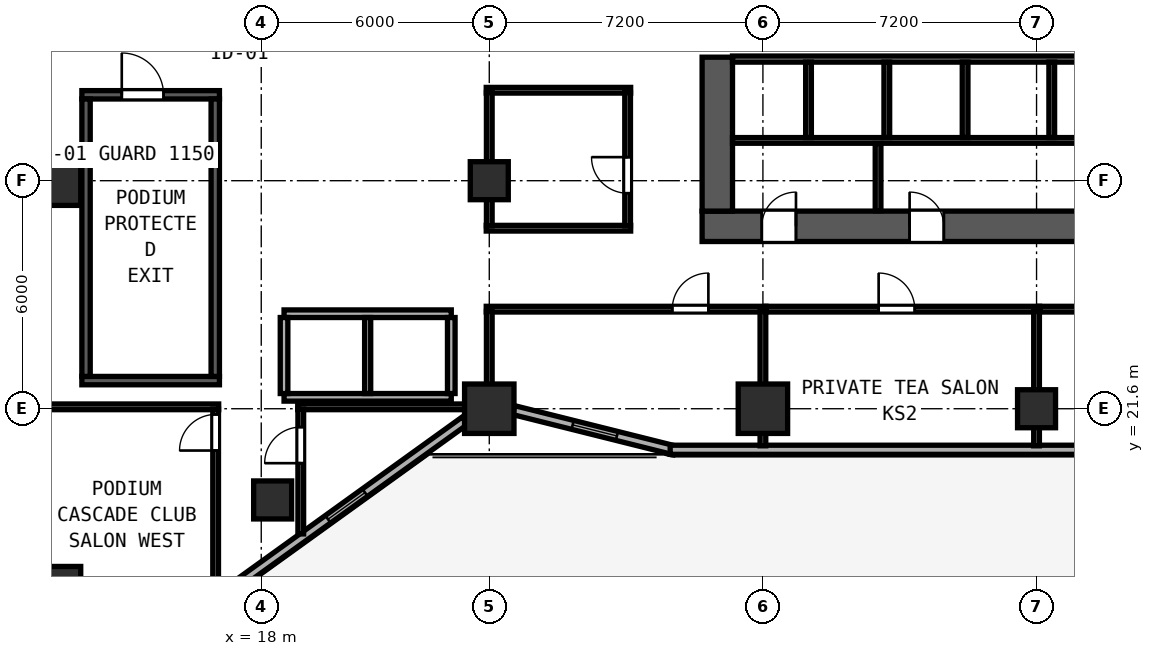
"""IFC4 building model, lengths in metres.
Left out: names, types, materials, properties, quantities, classifications, styles, units other than length and angle.
Written with IfcOpenShell. Run it as: python <this file> out.ifc"""

import sys

from ifc_helpers import new_model, si_unit, direction, frame, frame_2d, origin, origin_2d, place, context, subcontext, project, spatial, rectangle, hollow_rectangle, extrude, element, fill, save


model = new_model("IFC4")
c1 = context("Model", 3, precision=1e-05, world=origin(), true_north=direction((0.0, 1.0)))
c2 = subcontext(c1, "Body", "Model", "MODEL_VIEW")
j1 = project(units=[si_unit("LENGTHUNIT", "METRE"), si_unit("PLANEANGLEUNIT", "RADIAN")], contexts=[c1])
p1 = place(None, origin())
s1 = spatial("IfcSite", under=j1, at=p1, CompositionType="ELEMENT")
p2 = place(p1, origin())
s2 = spatial("IfcBuilding", under=s1, at=p2, CompositionType="ELEMENT")
p3 = place(p2, frame((0.0, 0.0, 24.0)))
s3 = spatial("IfcBuildingStorey", under=s2, at=p3, CompositionType="ELEMENT", Elevation=24.0)
p4 = place(p3, frame((29.6, 26.4, 0.0), z_axis=(0.0, 0.0, 1.0), x_axis=(1.0, 0.0, 0.0)))
e1 = element("IfcWall", 1, at=p4, inside=s3, PredefinedType="SHEAR", context=c2, shape_type="SweptSolid", body=[
    extrude(rectangle(XDim=17.6, YDim=0.8, at=frame_2d((8.8, 0.0))), origin(), (0.0, 0.0, 1.0), 3.6),
])
p5 = place(p4, frame((2.47, 0.0, 0.0), z_axis=(0.0, 0.0, 1.0), x_axis=(-1.0, 0.0, 0.0)))
e2 = element("IfcOpeningElement", 2, at=p5, cuts=e1, PredefinedType="OPENING", context=c2, shape_type="SweptSolid", body=[
    extrude(rectangle(XDim=0.9, YDim=2.1, at=frame_2d((0.45, 1.05))), frame((0.0, 0.41, 0.0), z_axis=(0.0, -1.0, 0.0), x_axis=(1.0, 0.0, 0.0)), (0.0, 0.0, 1.0), 0.82),
])
p6 = place(p4, frame((6.36, 0.0, 0.0), z_axis=(0.0, 0.0, 1.0), x_axis=(-1.0, 0.0, 0.0)))
e3 = element("IfcOpeningElement", 3, at=p6, cuts=e1, PredefinedType="OPENING", context=c2, shape_type="SweptSolid", body=[
    extrude(rectangle(XDim=0.9, YDim=2.1, at=frame_2d((0.45, 1.05))), frame((0.0, 0.41, 0.0), z_axis=(0.0, -1.0, 0.0), x_axis=(1.0, 0.0, 0.0)), (0.0, 0.0, 1.0), 0.82),
])
p7 = place(p3, frame((30.0, 26.8, 0.0), z_axis=(0.0, 0.0, 1.0), x_axis=(0.0, 1.0, 0.0)))
e4 = element("IfcWall", 4, at=p7, inside=s3, PredefinedType="SHEAR", context=c2, shape_type="SweptSolid", body=[
    extrude(rectangle(XDim=4.05, YDim=0.8, at=frame_2d((2.025, 0.0))), origin(), (0.0, 0.0, 1.0), 3.6),
])
p8 = place(p3, frame((13.28, 29.86, 0.0), z_axis=(0.0, 0.0, 1.0), x_axis=(1.0, 0.0, 0.0)))
e5 = element("IfcWall", 5, at=p8, inside=s3, PredefinedType="SHEAR", context=c2, shape_type="SweptSolid", body=[
    extrude(rectangle(XDim=3.62, YDim=0.22, at=frame_2d((1.81, 0.0))), origin(), (0.0, 0.0, 1.0), 3.6),
])
p9 = place(p8, frame((1.05, 0.0, 0.0)))
e6 = element("IfcOpeningElement", 6, at=p9, cuts=e5, PredefinedType="OPENING", context=c2, shape_type="SweptSolid", body=[
    extrude(rectangle(XDim=1.1, YDim=2.15, at=frame_2d((0.55, 1.075))), frame((0.0, 0.12, 0.0), z_axis=(0.0, -1.0, 0.0), x_axis=(1.0, 0.0, 0.0)), (0.0, 0.0, 1.0), 0.24),
])
p10 = place(p3, frame((13.28, 22.34, 0.0), z_axis=(0.0, 0.0, 1.0), x_axis=(1.0, 0.0, 0.0)))
e7 = element("IfcWall", 7, at=p10, inside=s3, PredefinedType="SHEAR", context=c2, shape_type="SweptSolid", body=[
    extrude(rectangle(XDim=3.62, YDim=0.22, at=frame_2d((1.81, 0.0))), origin(), (0.0, 0.0, 1.0), 3.6),
])
for number, where, z_axis, x_axis in (
    (8, (13.39, 22.45, 0.0), (0.0, 0.0, 1.0), (0.0, 1.0, 0.0)),
    (9, (16.79, 22.45, 0.0), (0.0, 0.0, 1.0), (0.0, 1.0, 0.0)),
):
    element("IfcWall", number, at=place(p3, frame(where, z_axis=z_axis, x_axis=x_axis)), inside=s3, PredefinedType="SHEAR", context=c2, shape_type="SweptSolid", body=[
        extrude(rectangle(XDim=7.3, YDim=0.22, at=frame_2d((3.65, 0.0))), origin(), (0.0, 0.0, 1.0), 3.6),
    ])
for number, where, z_axis, x_axis in (
    (10, (24.0, 21.6, 0.0), (0.0, 0.0, 1.0), (1.0, 0.0, 0.0)),
    (11, (31.2, 21.6, 0.0), (0.0, 0.0, 1.0), (1.0, 0.0, 0.0)),
    (12, (12.6, 16.8, 0.0), (0.0, 0.0, 1.0), (1.0, 0.0, 0.0)),
    (13, (12.6, 27.6, 0.0), (0.0, 0.0, 1.0), (1.0, 0.0, 0.0)),
):
    element("IfcColumn", number, at=place(p3, frame(where, z_axis=z_axis, x_axis=x_axis)), inside=s3, PredefinedType="COLUMN", context=c2, shape_type="SweptSolid", body=[
        extrude(hollow_rectangle(XDim=1.3, YDim=1.3, WallThickness=0.048, at=origin_2d()), origin(), (0.0, 0.0, 1.0), 3.8),
    ])
for number, where, z_axis, x_axis in (
    (14, (24.0, 27.6, -0.26), (0.0, 0.0, 1.0), (1.0, 0.0, 0.0)),
    (15, (38.4, 21.6, -0.26), (0.0, 0.0, 1.0), (1.0, 0.0, 0.0)),
    (16, (18.3, 19.2, -0.26), (0.0, 0.0, 1.0), (1.0, 0.0, 0.0)),
):
    element("IfcColumn", number, at=place(p3, frame(where, z_axis=z_axis, x_axis=x_axis)), inside=s3, PredefinedType="COLUMN", context=c2, shape_type="SweptSolid", body=[
        extrude(hollow_rectangle(XDim=1.0, YDim=1.0, WallThickness=0.038, at=origin_2d()), origin(), (0.0, 0.0, 1.0), 4.06),
    ])
p11 = place(p3, frame((14.075, 14.602, 0.0), z_axis=(0.0, 0.0, 1.0), x_axis=(0.811535555989, 0.584303038984, 0.0)))
e17 = element("IfcWall", 17, at=p11, inside=s3, PredefinedType="SOLIDWALL", context=c2, shape_type="SweptSolid", body=[
    extrude(rectangle(XDim=11.438, YDim=0.24, at=frame_2d((5.719, 0.0))), origin(), (0.0, 0.0, 1.0), 3.097),
])
p12 = place(p11, frame((1.6, 0.0, 0.85)))
e18 = element("IfcOpeningElement", 18, at=p12, cuts=e17, PredefinedType="OPENING", context=c2, shape_type="SweptSolid", body=[
    extrude(rectangle(XDim=1.2, YDim=1.85, at=frame_2d((0.6, 0.925))), frame((0.0, 0.13, 0.0), z_axis=(0.0, -1.0, 0.0), x_axis=(1.0, 0.0, 0.0)), (0.0, 0.0, 1.0), 0.26),
])
p13 = place(p11, frame((7.0, 0.0, 0.85)))
e19 = element("IfcOpeningElement", 19, at=p13, cuts=e17, PredefinedType="OPENING", context=c2, shape_type="SweptSolid", body=[
    extrude(rectangle(XDim=1.2, YDim=1.85, at=frame_2d((0.6, 0.925))), frame((0.0, 0.13, 0.0), z_axis=(0.0, -1.0, 0.0), x_axis=(1.0, 0.0, 0.0)), (0.0, 0.0, 1.0), 0.26),
])
p14 = place(p3, frame((24.642, 21.563, 0.0), z_axis=(0.0, 0.0, 1.0), x_axis=(0.970135906278, -0.242561998982, 0.0)))
e20 = element("IfcWall", 20, at=p14, inside=s3, PredefinedType="SOLIDWALL", context=c2, shape_type="SweptSolid", body=[
    extrude(rectangle(XDim=4.356, YDim=0.24, at=frame_2d((2.178, 0.0))), origin(), (0.0, 0.0, 1.0), 3.097),
])
p15 = place(p14, frame((1.6, 0.0, 0.85)))
e21 = element("IfcOpeningElement", 21, at=p15, cuts=e20, PredefinedType="OPENING", context=c2, shape_type="SweptSolid", body=[
    extrude(rectangle(XDim=1.2, YDim=1.85, at=frame_2d((0.6, 0.925))), frame((0.0, 0.13, 0.0), z_axis=(0.0, -1.0, 0.0), x_axis=(1.0, 0.0, 0.0)), (0.0, 0.0, 1.0), 0.26),
])
p16 = place(p3, frame((28.76, 20.52, 0.0), z_axis=(0.0, 0.0, 1.0), x_axis=(1.0, 0.0, 0.0)))
e22 = element("IfcWall", 22, at=p16, inside=s3, PredefinedType="SOLIDWALL", context=c2, shape_type="SweptSolid", body=[
    extrude(rectangle(XDim=19.281, YDim=0.24, at=frame_2d((9.64, 0.0))), origin(), (0.0, 0.0, 1.0), 3.6),
])
p17 = place(p16, frame((19.06, 0.0, 0.0), z_axis=(0.0, 0.0, 1.0), x_axis=(-1.0, 0.0, 0.0)))
e23 = element("IfcOpeningElement", 23, at=p17, cuts=e22, PredefinedType="OPENING", context=c2, shape_type="SweptSolid", body=[
    extrude(rectangle(XDim=1.5, YDim=2.2, at=frame_2d((0.75, 1.1))), frame((0.0, 0.13, 0.0), z_axis=(0.0, -1.0, 0.0), x_axis=(1.0, 0.0, 0.0)), (0.0, 0.0, 1.0), 0.26),
])
p18 = place(p3, frame((30.4, 30.8, 0.0), z_axis=(0.0, 0.0, 1.0), x_axis=(1.0, 0.0, 0.0)))
e24 = element("IfcWall", 24, at=p18, inside=s3, PredefinedType="SOLIDWALL", context=c2, shape_type="SweptSolid", body=[
    extrude(rectangle(XDim=16.0, YDim=0.16, at=frame_2d((8.0, 0.0))), origin(), (0.0, 0.0, 1.0), 3.6),
])
p19 = place(p3, frame((30.4, 28.66, 0.0), z_axis=(0.0, 0.0, 1.0), x_axis=(1.0, 0.0, 0.0)))
e25 = element("IfcWall", 25, at=p19, inside=s3, PredefinedType="PARTITIONING", context=c2, shape_type="SweptSolid", body=[
    extrude(rectangle(XDim=16.0, YDim=0.15, at=frame_2d((8.0, 0.0))), origin(), (0.0, 0.0, 1.0), 3.6),
])
for number, where, z_axis, x_axis in (
    (26, (32.4, 28.735, 0.0), (0.0, 0.0, 1.0), (0.0, 1.0, 0.0)),
    (27, (34.46, 28.735, 0.0), (0.0, 0.0, 1.0), (0.0, 1.0, 0.0)),
    (28, (36.52, 28.735, 0.0), (0.0, 0.0, 1.0), (0.0, 1.0, 0.0)),
    (29, (38.8, 28.735, 0.0), (0.0, 0.0, 1.0), (0.0, 1.0, 0.0)),
):
    element("IfcWall", number, at=place(p3, frame(where, z_axis=z_axis, x_axis=x_axis)), inside=s3, PredefinedType="SOLIDWALL", context=c2, shape_type="SweptSolid", body=[
        extrude(rectangle(XDim=1.985, YDim=0.15, at=frame_2d((0.992, 0.0))), origin(), (0.0, 0.0, 1.0), 3.6),
    ])
p20 = place(p3, frame((34.23, 26.81, 0.0), z_axis=(0.0, 0.0, 1.0), x_axis=(0.0, 1.0, 0.0)))
e30 = element("IfcWall", 30, at=p20, inside=s3, PredefinedType="PARTITIONING", context=c2, shape_type="SweptSolid", body=[
    extrude(rectangle(XDim=1.77, YDim=0.15, at=frame_2d((0.885, 0.0))), origin(), (0.0, 0.0, 1.0), 3.6),
])
for number, where, z_axis, x_axis in (
    (31, (18.6, 24.1, 0.0), (0.0, 0.0, 1.0), (1.0, 0.0, 0.0)),
    (32, (18.6, 21.9, 0.0), (0.0, 0.0, 1.0), (1.0, 0.0, 0.0)),
):
    element("IfcWall", number, at=place(p3, frame(where, z_axis=z_axis, x_axis=x_axis)), inside=s3, PredefinedType="SOLIDWALL", context=c2, shape_type="SweptSolid", body=[
        extrude(rectangle(XDim=4.4, YDim=0.2, at=frame_2d((2.2, 0.0))), origin(), (0.0, 0.0, 1.0), 3.6),
    ])
for number, where, z_axis, x_axis in (
    (33, (18.6, 22.0, 0.0), (0.0, 0.0, 1.0), (0.0, 1.0, 0.0)),
    (34, (23.0, 22.0, 0.0), (0.0, 0.0, 1.0), (0.0, 1.0, 0.0)),
):
    element("IfcWall", number, at=place(p3, frame(where, z_axis=z_axis, x_axis=x_axis)), inside=s3, PredefinedType="SOLIDWALL", context=c2, shape_type="SweptSolid", body=[
        extrude(rectangle(XDim=2.0, YDim=0.2, at=frame_2d((1.0, 0.0))), origin(), (0.0, 0.0, 1.0), 3.6),
    ])
p21 = place(p3, frame((20.8, 22.0, 0.0), z_axis=(0.0, 0.0, 1.0), x_axis=(0.0, 1.0, 0.0)))
e35 = element("IfcWall", 35, at=p21, inside=s3, PredefinedType="SOLIDWALL", context=c2, shape_type="SweptSolid", body=[
    extrude(rectangle(XDim=2.0, YDim=0.16, at=frame_2d((1.0, 0.0))), origin(), (0.0, 0.0, 1.0), 3.6),
])
for number, where, z_axis, x_axis in (
    (36, (23.92, 29.98, 0.0), (0.0, 0.0, 1.0), (1.0, 0.0, 0.0)),
    (37, (23.92, 26.35, 0.0), (0.0, 0.0, 1.0), (1.0, 0.0, 0.0)),
):
    element("IfcWall", number, at=place(p3, frame(where, z_axis=z_axis, x_axis=x_axis)), inside=s3, PredefinedType="PARTITIONING", context=c2, shape_type="SweptSolid", body=[
        extrude(rectangle(XDim=3.8, YDim=0.15, at=frame_2d((1.9, 0.0))), origin(), (0.0, 0.0, 1.0), 3.6),
    ])
p22 = place(p3, frame((24.0, 26.41, 0.0), z_axis=(0.0, 0.0, 1.0), x_axis=(0.0, 1.0, 0.0)))
e38 = element("IfcWall", 38, at=p22, inside=s3, PredefinedType="PARTITIONING", context=c2, shape_type="SweptSolid", body=[
    extrude(rectangle(XDim=3.51, YDim=0.15, at=frame_2d((1.755, 0.0))), origin(), (0.0, 0.0, 1.0), 3.097),
])
p23 = place(p3, frame((27.64, 26.41, 0.0), z_axis=(0.0, 0.0, 1.0), x_axis=(0.0, 1.0, 0.0)))
e39 = element("IfcWall", 39, at=p23, inside=s3, PredefinedType="PARTITIONING", context=c2, shape_type="SweptSolid", body=[
    extrude(rectangle(XDim=3.51, YDim=0.15, at=frame_2d((1.755, 0.0))), origin(), (0.0, 0.0, 1.0), 3.6),
])
p24 = place(p23, frame((1.81, 0.0, 0.0), z_axis=(0.0, 0.0, 1.0), x_axis=(-1.0, 0.0, 0.0)))
e40 = element("IfcOpeningElement", 40, at=p24, cuts=e39, PredefinedType="OPENING", context=c2, shape_type="SweptSolid", body=[
    extrude(rectangle(XDim=0.95, YDim=2.12, at=frame_2d((0.475, 1.06))), frame((0.0, 0.085, 0.0), z_axis=(0.0, -1.0, 0.0), x_axis=(1.0, 0.0, 0.0)), (0.0, 0.0, 1.0), 0.17),
])
p25 = place(p3, frame((23.92, 24.22, 0.0), z_axis=(0.0, 0.0, 1.0), x_axis=(1.0, 0.0, 0.0)))
e41 = element("IfcWall", 41, at=p25, inside=s3, PredefinedType="PARTITIONING", context=c2, shape_type="SweptSolid", body=[
    extrude(rectangle(XDim=7.36, YDim=0.15, at=frame_2d((3.68, 0.0))), origin(), (0.0, 0.0, 1.0), 3.6),
])
p26 = place(p25, frame((5.845, 0.0, 0.0), z_axis=(0.0, 0.0, 1.0), x_axis=(-1.0, 0.0, 0.0)))
e42 = element("IfcOpeningElement", 42, at=p26, cuts=e41, PredefinedType="OPENING", context=c2, shape_type="SweptSolid", body=[
    extrude(rectangle(XDim=0.95, YDim=2.12, at=frame_2d((0.475, 1.06))), frame((0.0, 0.085, 0.0), z_axis=(0.0, -1.0, 0.0), x_axis=(1.0, 0.0, 0.0)), (0.0, 0.0, 1.0), 0.17),
])
p27 = place(p3, frame((24.0, 21.819, 0.0), z_axis=(0.0, 0.0, 1.0), x_axis=(0.0, 1.0, 0.0)))
e43 = element("IfcWall", 43, at=p27, inside=s3, PredefinedType="PARTITIONING", context=c2, shape_type="SweptSolid", body=[
    extrude(rectangle(XDim=2.341, YDim=0.15, at=frame_2d((1.171, 0.0))), origin(), (0.0, 0.0, 1.0), 3.097),
])
p28 = place(p3, frame((31.2, 20.625, 0.0), z_axis=(0.0, 0.0, 1.0), x_axis=(0.0, 1.0, 0.0)))
e44 = element("IfcWall", 44, at=p28, inside=s3, PredefinedType="PARTITIONING", context=c2, shape_type="SweptSolid", body=[
    extrude(rectangle(XDim=3.535, YDim=0.15, at=frame_2d((1.768, 0.0))), origin(), (0.0, 0.0, 1.0), 2.985),
])
p29 = place(p3, frame((31.282, 24.22, 0.0), z_axis=(0.0, 0.0, 1.0), x_axis=(1.0, 0.0, 0.0)))
e45 = element("IfcWall", 45, at=p29, inside=s3, PredefinedType="PARTITIONING", context=c2, shape_type="SweptSolid", body=[
    extrude(rectangle(XDim=7.198, YDim=0.15, at=frame_2d((3.599, 0.0))), origin(), (0.0, 0.0, 1.0), 3.6),
])
p30 = place(p29, frame((3.913, 0.0, 0.0), z_axis=(0.0, 0.0, 1.0), x_axis=(-1.0, 0.0, 0.0)))
e46 = element("IfcOpeningElement", 46, at=p30, cuts=e45, PredefinedType="OPENING", context=c2, shape_type="SweptSolid", body=[
    extrude(rectangle(XDim=0.95, YDim=2.12, at=frame_2d((0.475, 1.06))), frame((0.0, 0.085, 0.0), z_axis=(0.0, -1.0, 0.0), x_axis=(1.0, 0.0, 0.0)), (0.0, 0.0, 1.0), 0.17),
])
p31 = place(p3, frame((38.4, 20.625, 0.0), z_axis=(0.0, 0.0, 1.0), x_axis=(0.0, 1.0, 0.0)))
e47 = element("IfcWall", 47, at=p31, inside=s3, PredefinedType="PARTITIONING", context=c2, shape_type="SweptSolid", body=[
    extrude(rectangle(XDim=3.535, YDim=0.15, at=frame_2d((1.768, 0.0))), origin(), (0.0, 0.0, 1.0), 2.985),
])
p32 = place(p3, frame((38.482, 24.22, 0.0), z_axis=(0.0, 0.0, 1.0), x_axis=(1.0, 0.0, 0.0)))
e48 = element("IfcWall", 48, at=p32, inside=s3, PredefinedType="PARTITIONING", context=c2, shape_type="SweptSolid", body=[
    extrude(rectangle(XDim=7.198, YDim=0.15, at=frame_2d((3.599, 0.0))), origin(), (0.0, 0.0, 1.0), 3.6),
])
p33 = place(p32, frame((3.913, 0.0, 0.0), z_axis=(0.0, 0.0, 1.0), x_axis=(-1.0, 0.0, 0.0)))
e49 = element("IfcOpeningElement", 49, at=p33, cuts=e48, PredefinedType="OPENING", context=c2, shape_type="SweptSolid", body=[
    extrude(rectangle(XDim=0.95, YDim=2.12, at=frame_2d((0.475, 1.06))), frame((0.0, 0.085, 0.0), z_axis=(0.0, -1.0, 0.0), x_axis=(1.0, 0.0, 0.0)), (0.0, 0.0, 1.0), 0.17),
])
p34 = place(p3, frame((18.96, 21.65, 0.0), z_axis=(0.0, 0.0, 1.0), x_axis=(1.0, 0.0, 0.0)))
e50 = element("IfcWall", 50, at=p34, inside=s3, PredefinedType="PARTITIONING", context=c2, shape_type="SweptSolid", body=[
    extrude(rectangle(XDim=4.747, YDim=0.15, at=frame_2d((2.373, 0.0))), origin(), (0.0, 0.0, 1.0), 3.6),
])
p35 = place(p3, frame((19.04, 18.306, 0.0), z_axis=(0.0, 0.0, 1.0), x_axis=(0.0, 1.0, 0.0)))
e51 = element("IfcWall", 51, at=p35, inside=s3, PredefinedType="PARTITIONING", context=c2, shape_type="SweptSolid", body=[
    extrude(rectangle(XDim=3.284, YDim=0.15, at=frame_2d((1.642, 0.0))), origin(), (0.0, 0.0, 1.0), 3.6),
])
p36 = place(p35, frame((1.861, 0.0, 0.0)))
e52 = element("IfcOpeningElement", 52, at=p36, cuts=e51, PredefinedType="OPENING", context=c2, shape_type="SweptSolid", body=[
    extrude(rectangle(XDim=0.95, YDim=2.12, at=frame_2d((0.475, 1.06))), frame((0.0, 0.085, 0.0), z_axis=(0.0, -1.0, 0.0), x_axis=(1.0, 0.0, 0.0)), (0.0, 0.0, 1.0), 0.17),
])
p37 = place(p3, frame((12.08, 21.65, 0.0), z_axis=(0.0, 0.0, 1.0), x_axis=(1.0, 0.0, 0.0)))
e53 = element("IfcWall", 53, at=p37, inside=s3, PredefinedType="PARTITIONING", context=c2, shape_type="SweptSolid", body=[
    extrude(rectangle(XDim=4.8, YDim=0.15, at=frame_2d((2.4, 0.0))), origin(), (0.0, 0.0, 1.0), 3.6),
])
p38 = place(p3, frame((16.8, 16.693, 0.0), z_axis=(0.0, 0.0, 1.0), x_axis=(0.0, 1.0, 0.0)))
e54 = element("IfcWall", 54, at=p38, inside=s3, PredefinedType="PARTITIONING", context=c2, shape_type="SweptSolid", body=[
    extrude(rectangle(XDim=4.897, YDim=0.15, at=frame_2d((2.448, 0.0))), origin(), (0.0, 0.0, 1.0), 3.6),
])
p39 = place(p38, frame((4.757, 0.0, 0.0), z_axis=(0.0, 0.0, 1.0), x_axis=(-1.0, 0.0, 0.0)))
e55 = element("IfcOpeningElement", 55, at=p39, cuts=e54, PredefinedType="OPENING", context=c2, shape_type="SweptSolid", body=[
    extrude(rectangle(XDim=0.95, YDim=2.12, at=frame_2d((0.475, 1.06))), frame((0.0, 0.085, 0.0), z_axis=(0.0, -1.0, 0.0), x_axis=(1.0, 0.0, 0.0)), (0.0, 0.0, 1.0), 0.17),
])
p40 = place(p13, origin())
e56 = element("IfcWindow", 56, at=p40, inside=s3, PartitioningType="SINGLE_PANEL", PredefinedType="WINDOW", context=c2, shape_type="SweptSolid", body=[
    extrude(rectangle(XDim=1.2, YDim=1.85, at=frame_2d((0.6, 0.925))), frame((0.0, 0.03, 0.0), z_axis=(0.0, -1.0, 0.0), x_axis=(1.0, 0.0, 0.0)), (0.0, 0.0, 1.0), 0.06),
])
fill(e19, e56)
p41 = place(p15, origin())
e57 = element("IfcWindow", 57, at=p41, inside=s3, PartitioningType="SINGLE_PANEL", PredefinedType="WINDOW", context=c2, shape_type="SweptSolid", body=[
    extrude(rectangle(XDim=1.2, YDim=1.85, at=frame_2d((0.6, 0.925))), frame((0.0, 0.03, 0.0), z_axis=(0.0, -1.0, 0.0), x_axis=(1.0, 0.0, 0.0)), (0.0, 0.0, 1.0), 0.06),
])
fill(e21, e57)
p42 = place(p5, origin())
e58 = element("IfcDoor", 58, at=p42, inside=s3, OperationType="SINGLE_SWING_LEFT", PredefinedType="DOOR", context=c2, shape_type="SweptSolid", body=[
    extrude(rectangle(XDim=0.9, YDim=2.1, at=frame_2d((0.45, 1.05))), frame((0.0, -0.195, 0.0), z_axis=(0.0, -1.0, 0.0), x_axis=(1.0, 0.0, 0.0)), (0.0, 0.0, 1.0), 0.05),
])
fill(e2, e58)
p43 = place(p6, origin())
e59 = element("IfcDoor", 59, at=p43, inside=s3, OperationType="SINGLE_SWING_RIGHT", PredefinedType="DOOR", context=c2, shape_type="SweptSolid", body=[
    extrude(rectangle(XDim=0.9, YDim=2.1, at=frame_2d((0.45, 1.05))), frame((0.0, -0.195, 0.0), z_axis=(0.0, -1.0, 0.0), x_axis=(1.0, 0.0, 0.0)), (0.0, 0.0, 1.0), 0.05),
])
fill(e3, e59)
p44 = place(p9, origin())
e60 = element("IfcDoor", 60, at=p44, inside=s3, OperationType="SINGLE_SWING_LEFT", PredefinedType="DOOR", context=c2, shape_type="SweptSolid", body=[
    extrude(rectangle(XDim=1.1, YDim=2.15, at=frame_2d((0.55, 1.075))), frame((0.0, 0.025, 0.0), z_axis=(0.0, -1.0, 0.0), x_axis=(1.0, 0.0, 0.0)), (0.0, 0.0, 1.0), 0.05),
])
fill(e6, e60)
p45 = place(p24, origin())
e61 = element("IfcDoor", 61, at=p45, inside=s3, OperationType="SINGLE_SWING_LEFT", PredefinedType="DOOR", context=c2, shape_type="SweptSolid", body=[
    extrude(rectangle(XDim=0.95, YDim=2.12, at=frame_2d((0.475, 1.06))), frame((0.0, 0.025, 0.0), z_axis=(0.0, -1.0, 0.0), x_axis=(1.0, 0.0, 0.0)), (0.0, 0.0, 1.0), 0.05),
])
fill(e40, e61)
p46 = place(p26, origin())
e62 = element("IfcDoor", 62, at=p46, inside=s3, OperationType="SINGLE_SWING_LEFT", PredefinedType="DOOR", context=c2, shape_type="SweptSolid", body=[
    extrude(rectangle(XDim=0.95, YDim=2.12, at=frame_2d((0.475, 1.06))), frame((0.0, 0.025, 0.0), z_axis=(0.0, -1.0, 0.0), x_axis=(1.0, 0.0, 0.0)), (0.0, 0.0, 1.0), 0.05),
])
fill(e42, e62)
p47 = place(p30, origin())
e63 = element("IfcDoor", 63, at=p47, inside=s3, OperationType="SINGLE_SWING_RIGHT", PredefinedType="DOOR", context=c2, shape_type="SweptSolid", body=[
    extrude(rectangle(XDim=0.95, YDim=2.12, at=frame_2d((0.475, 1.06))), frame((0.0, 0.025, 0.0), z_axis=(0.0, -1.0, 0.0), x_axis=(1.0, 0.0, 0.0)), (0.0, 0.0, 1.0), 0.05),
])
fill(e46, e63)
p48 = place(p36, origin())
e64 = element("IfcDoor", 64, at=p48, inside=s3, OperationType="SINGLE_SWING_LEFT", PredefinedType="DOOR", context=c2, shape_type="SweptSolid", body=[
    extrude(rectangle(XDim=0.95, YDim=2.12, at=frame_2d((0.475, 1.06))), frame((0.0, 0.025, 0.0), z_axis=(0.0, -1.0, 0.0), x_axis=(1.0, 0.0, 0.0)), (0.0, 0.0, 1.0), 0.05),
])
fill(e52, e64)
p49 = place(p39, origin())
e65 = element("IfcDoor", 65, at=p49, inside=s3, OperationType="SINGLE_SWING_RIGHT", PredefinedType="DOOR", context=c2, shape_type="SweptSolid", body=[
    extrude(rectangle(XDim=0.95, YDim=2.12, at=frame_2d((0.475, 1.06))), frame((0.0, 0.025, 0.0), z_axis=(0.0, -1.0, 0.0), x_axis=(1.0, 0.0, 0.0)), (0.0, 0.0, 1.0), 0.05),
])
fill(e55, e65)
save(model, sys.argv[1])
